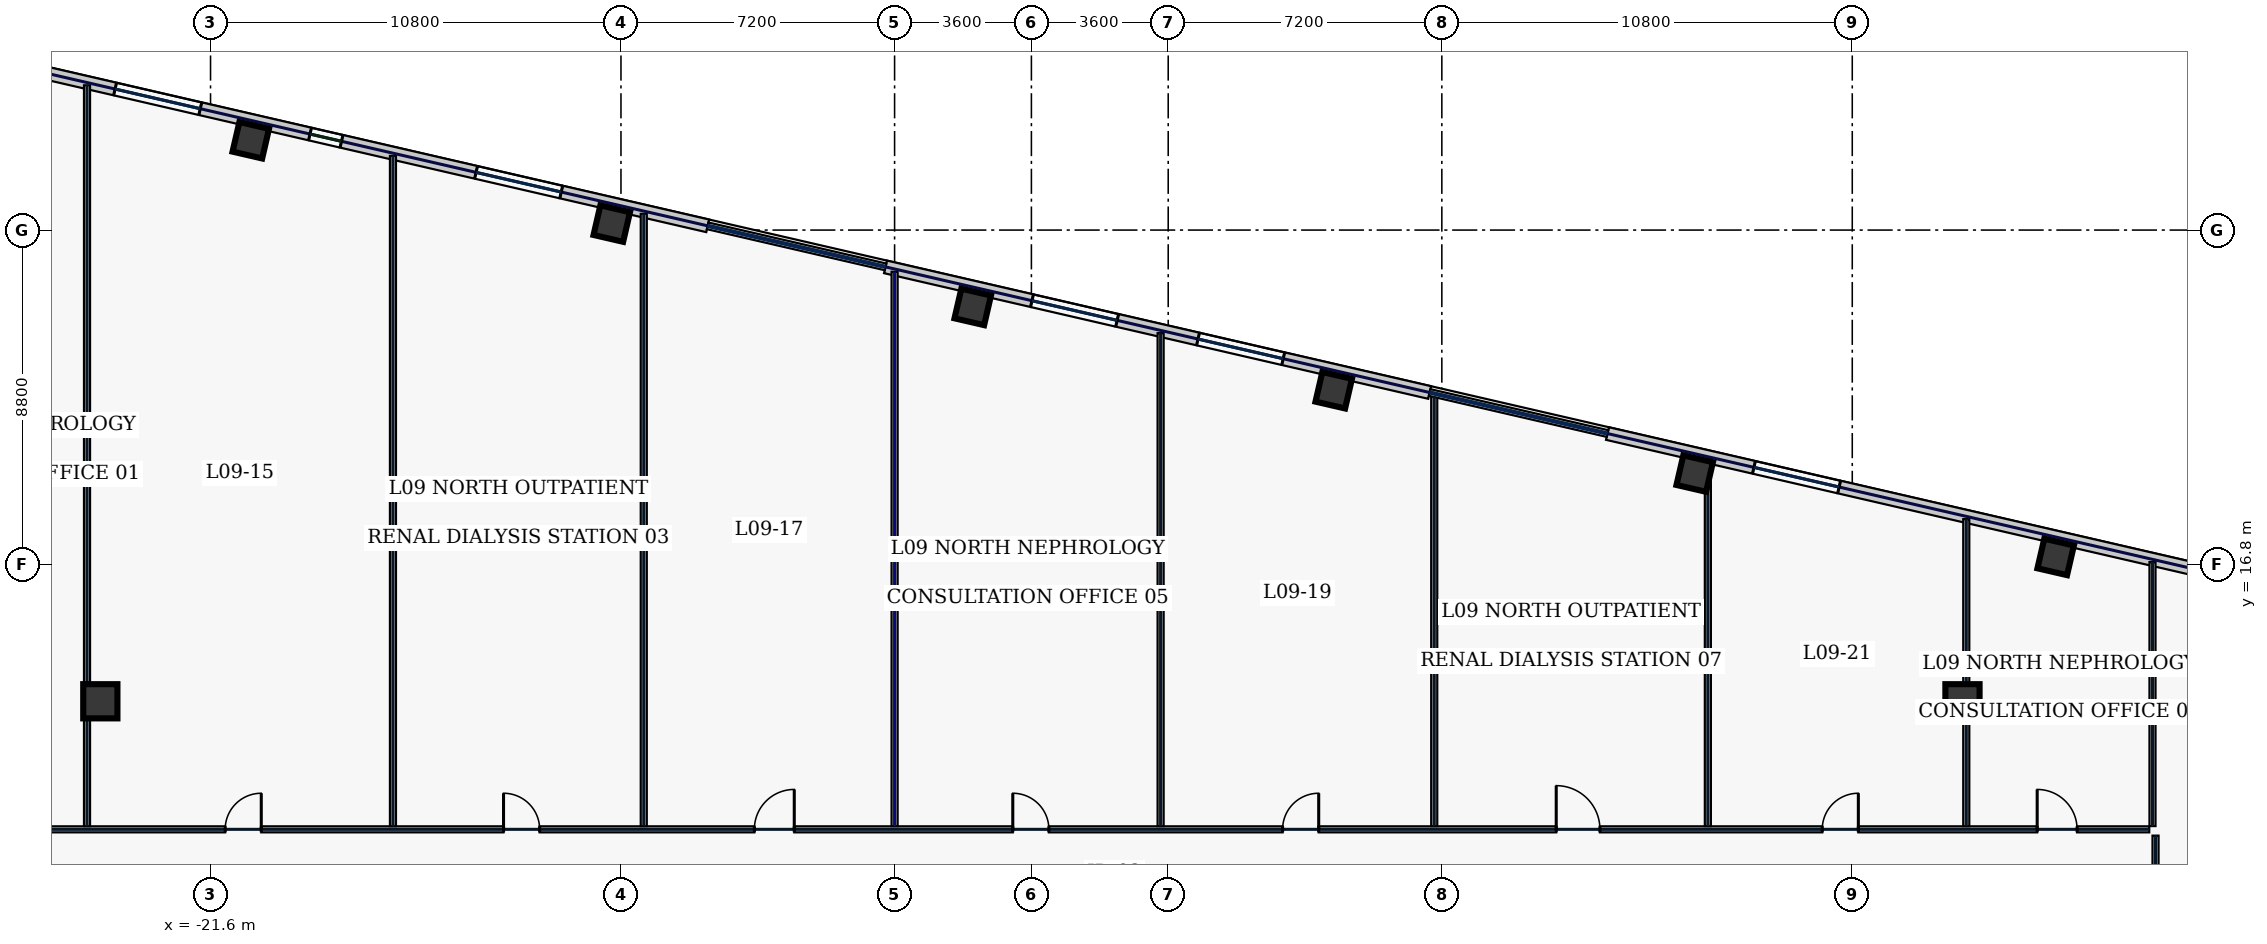
"""IFC4 building model, lengths in metres.
Left out: names, types, materials, properties, quantities, classifications, styles, units other than length and angle.
Written with IfcOpenShell. Run it as: python <this file> out.ifc"""

import sys

from ifc_helpers import new_model, si_unit, direction, frame, frame_2d, origin, origin_2d, place, context, subcontext, project, spatial, rectangle, hollow_rectangle, extrude, element, fill, save


model = new_model("IFC4")
c1 = context("Model", 3, precision=1e-05, world=origin(), true_north=direction((0.0, 1.0)))
c2 = subcontext(c1, "Body", "Model", "MODEL_VIEW")
j1 = project(units=[si_unit("LENGTHUNIT", "METRE"), si_unit("PLANEANGLEUNIT", "RADIAN")], contexts=[c1])
p1 = place(None, origin())
s1 = spatial("IfcSite", under=j1, at=p1, CompositionType="ELEMENT")
p2 = place(p1, origin())
s2 = spatial("IfcBuilding", under=s1, at=p2, CompositionType="ELEMENT")
p3 = place(p2, frame((0.0, 0.0, 47.4)))
s3 = spatial("IfcBuildingStorey", under=s2, at=p3, CompositionType="ELEMENT", Elevation=47.4)
for number, where, z_axis, x_axis in (
    (1, (-24.5, 13.2, 0.0), (0.0, 0.0, 1.0), (1.0, 0.0, 0.0)),
    (2, (24.5, 13.2, 0.0), (0.0, 0.0, 1.0), (1.0, 0.0, 0.0)),
):
    element("IfcColumn", number, at=place(p3, frame(where, z_axis=z_axis, x_axis=x_axis)), inside=s3, PredefinedType="COLUMN", context=c2, shape_type="SweptSolid", body=[
        extrude(hollow_rectangle(XDim=0.9, YDim=0.9, WallThickness=0.04, at=origin_2d()), origin(), (0.0, 0.0, 1.0), 3.74),
    ])
for number, where, z_axis, x_axis in (
    (3, (26.952, 16.999, 0.0), (0.0, 0.0, 1.0), (0.974, -0.225, 0.0)),
    (4, (17.454, 19.192, 0.0), (0.0, 0.0, 1.0), (0.974, -0.225, 0.0)),
    (5, (7.955, 21.385, 0.0), (0.0, 0.0, 1.0), (0.974, -0.225, 0.0)),
    (6, (-1.544, 23.578, 0.0), (0.0, 0.0, 1.0), (0.974, -0.225, 0.0)),
    (7, (-11.042, 25.771, 0.0), (0.0, 0.0, 1.0), (0.974, -0.225, 0.0)),
    (8, (-20.541, 27.964, 0.0), (0.0, 0.0, 1.0), (0.974, -0.225, 0.0)),
):
    element("IfcColumn", number, at=place(p3, frame(where, z_axis=z_axis, x_axis=x_axis)), inside=s3, PredefinedType="COLUMN", context=c2, shape_type="SweptSolid", body=[
        extrude(hollow_rectangle(XDim=0.8, YDim=0.8, WallThickness=0.036, at=origin_2d()), origin(), (0.0, 0.0, 1.0), 3.74),
    ])
p4 = place(p3, frame((37.229, 15.15, 0.0), z_axis=(0.0, 0.0, 1.0), x_axis=(-0.97436993772, 0.224951604723, 0.0)))
e9 = element("IfcWall", 9, at=p4, inside=s3, PredefinedType="STANDARD", context=c2, shape_type="SweptSolid", body=[
    extrude(rectangle(XDim=22.651, YDim=0.34, at=frame_2d((11.326, 0.0))), origin(), (0.0, 0.0, 1.0), 3.74),
])
p5 = place(p4, frame((16.395, 0.0, 0.77)))
e10 = element("IfcOpeningElement", 10, at=p5, cuts=e9, PredefinedType="OPENING", context=c2, shape_type="SweptSolid", body=[
    extrude(rectangle(XDim=2.3, YDim=2.1, at=frame_2d((1.15, 1.05))), frame((0.0, 0.18, 0.0), z_axis=(0.0, -1.0, 0.0), x_axis=(1.0, 0.0, 0.0)), (0.0, 0.0, 1.0), 0.36),
])
p6 = place(p4, frame((2.162, 0.0, 0.77)))
e11 = element("IfcOpeningElement", 11, at=p6, cuts=e9, PredefinedType="OPENING", context=c2, shape_type="SweptSolid", body=[
    extrude(rectangle(XDim=2.3, YDim=2.1, at=frame_2d((1.15, 1.05))), frame((0.0, 0.18, 0.0), z_axis=(0.0, -1.0, 0.0), x_axis=(1.0, 0.0, 0.0)), (0.0, 0.0, 1.0), 0.36),
])
p7 = place(p3, frame((10.481, 21.325, 0.0), z_axis=(0.0, 0.0, 1.0), x_axis=(-0.974369353393, 0.2249541357, 0.0)))
e12 = element("IfcWall", 12, at=p7, inside=s3, PredefinedType="STANDARD", context=c2, shape_type="SweptSolid", body=[
    extrude(rectangle(XDim=14.697, YDim=0.34, at=frame_2d((7.349, 0.0))), origin(), (0.0, 0.0, 1.0), 3.74),
])
p8 = place(p7, frame((8.441, 0.0, 0.77)))
e13 = element("IfcOpeningElement", 13, at=p8, cuts=e12, PredefinedType="OPENING", context=c2, shape_type="SweptSolid", body=[
    extrude(rectangle(XDim=2.3, YDim=2.1, at=frame_2d((1.15, 1.05))), frame((0.0, 0.18, 0.0), z_axis=(0.0, -1.0, 0.0), x_axis=(1.0, 0.0, 0.0)), (0.0, 0.0, 1.0), 0.36),
])
p9 = place(p7, frame((3.956, 0.0, 0.77)))
e14 = element("IfcOpeningElement", 14, at=p9, cuts=e12, PredefinedType="OPENING", context=c2, shape_type="SweptSolid", body=[
    extrude(rectangle(XDim=2.3, YDim=2.1, at=frame_2d((1.15, 1.05))), frame((0.0, 0.18, 0.0), z_axis=(0.0, -1.0, 0.0), x_axis=(1.0, 0.0, 0.0)), (0.0, 0.0, 1.0), 0.36),
])
p10 = place(p3, frame((-8.517, 25.711, 0.0), z_axis=(0.0, 0.0, 1.0), x_axis=(-0.974372845456, 0.224939009598, 0.0)))
e15 = element("IfcWall", 15, at=p10, inside=s3, PredefinedType="STANDARD", context=c2, shape_type="SweptSolid", body=[
    extrude(rectangle(XDim=22.652, YDim=0.34, at=frame_2d((11.326, 0.0))), origin(), (0.0, 0.0, 1.0), 3.74),
])
p11 = place(p10, frame((18.189, 0.0, 0.77)))
e16 = element("IfcOpeningElement", 16, at=p11, cuts=e15, PredefinedType="OPENING", context=c2, shape_type="SweptSolid", body=[
    extrude(rectangle(XDim=2.3, YDim=2.1, at=frame_2d((1.15, 1.05))), frame((0.0, 0.18, 0.0), z_axis=(0.0, -1.0, 0.0), x_axis=(1.0, 0.0, 0.0)), (0.0, 0.0, 1.0), 0.36),
])
p12 = place(p10, frame((13.705, 0.0, 0.77)))
e17 = element("IfcOpeningElement", 17, at=p12, cuts=e15, PredefinedType="OPENING", context=c2, shape_type="SweptSolid", body=[
    extrude(rectangle(XDim=2.3, YDim=2.1, at=frame_2d((1.15, 1.05))), frame((0.0, 0.18, 0.0), z_axis=(0.0, -1.0, 0.0), x_axis=(1.0, 0.0, 0.0)), (0.0, 0.0, 1.0), 0.36),
])
p13 = place(p10, frame((9.891, 0.0, 0.77)))
e18 = element("IfcOpeningElement", 18, at=p13, cuts=e15, PredefinedType="OPENING", context=c2, shape_type="SweptSolid", body=[
    extrude(rectangle(XDim=0.85, YDim=1.85, at=frame_2d((0.425, 0.925))), frame((0.0, 0.18, 0.0), z_axis=(0.0, -1.0, 0.0), x_axis=(1.0, 0.0, 0.0)), (0.0, 0.0, 1.0), 0.36),
])
p14 = place(p10, frame((3.956, 0.0, 0.77)))
e19 = element("IfcOpeningElement", 19, at=p14, cuts=e15, PredefinedType="OPENING", context=c2, shape_type="SweptSolid", body=[
    extrude(rectangle(XDim=2.3, YDim=2.1, at=frame_2d((1.15, 1.05))), frame((0.0, 0.18, 0.0), z_axis=(0.0, -1.0, 0.0), x_axis=(1.0, 0.0, 0.0)), (0.0, 0.0, 1.0), 0.36),
])
p15 = place(p3, frame((-29.415, 9.83, 0.0), z_axis=(0.0, 0.0, 1.0), x_axis=(1.0, 0.0, 0.0)))
e20 = element("IfcWall", 20, at=p15, inside=s3, PredefinedType="PARTITIONING", context=c2, shape_type="SweptSolid", body=[
    extrude(rectangle(XDim=58.83, YDim=0.16, at=frame_2d((29.415, 0.0))), origin(), (0.0, 0.0, 1.0), 3.74),
])
p16 = place(p15, frame((2.044, 0.0, 0.0)))
e21 = element("IfcOpeningElement", 21, at=p16, cuts=e20, PredefinedType="OPENING", context=c2, shape_type="SweptSolid", body=[
    extrude(rectangle(XDim=0.95, YDim=2.2, at=frame_2d((0.475, 1.1))), frame((0.0, 0.09, 0.0), z_axis=(0.0, -1.0, 0.0), x_axis=(1.0, 0.0, 0.0)), (0.0, 0.0, 1.0), 0.18),
])
p17 = place(p15, frame((8.2, 0.0, 0.0)))
e22 = element("IfcOpeningElement", 22, at=p17, cuts=e20, PredefinedType="OPENING", context=c2, shape_type="SweptSolid", body=[
    extrude(rectangle(XDim=0.95, YDim=2.2, at=frame_2d((0.475, 1.1))), frame((0.0, 0.09, 0.0), z_axis=(0.0, -1.0, 0.0), x_axis=(1.0, 0.0, 0.0)), (0.0, 0.0, 1.0), 0.18),
])
p18 = place(p15, frame((15.525, 0.0, 0.0)))
e23 = element("IfcOpeningElement", 23, at=p18, cuts=e20, PredefinedType="OPENING", context=c2, shape_type="SweptSolid", body=[
    extrude(rectangle(XDim=0.95, YDim=2.2, at=frame_2d((0.475, 1.1))), frame((0.0, 0.09, 0.0), z_axis=(0.0, -1.0, 0.0), x_axis=(1.0, 0.0, 0.0)), (0.0, 0.0, 1.0), 0.18),
])
p19 = place(p15, frame((22.125, 0.0, 0.0)))
e24 = element("IfcOpeningElement", 24, at=p19, cuts=e20, PredefinedType="OPENING", context=c2, shape_type="SweptSolid", body=[
    extrude(rectangle(XDim=1.05, YDim=2.2, at=frame_2d((0.525, 1.1))), frame((0.0, 0.09, 0.0), z_axis=(0.0, -1.0, 0.0), x_axis=(1.0, 0.0, 0.0)), (0.0, 0.0, 1.0), 0.18),
])
p20 = place(p15, frame((28.925, 0.0, 0.0)))
e25 = element("IfcOpeningElement", 25, at=p20, cuts=e20, PredefinedType="OPENING", context=c2, shape_type="SweptSolid", body=[
    extrude(rectangle(XDim=0.95, YDim=2.2, at=frame_2d((0.475, 1.1))), frame((0.0, 0.09, 0.0), z_axis=(0.0, -1.0, 0.0), x_axis=(1.0, 0.0, 0.0)), (0.0, 0.0, 1.0), 0.18),
])
p21 = place(p15, frame((36.025, 0.0, 0.0)))
e26 = element("IfcOpeningElement", 26, at=p21, cuts=e20, PredefinedType="OPENING", context=c2, shape_type="SweptSolid", body=[
    extrude(rectangle(XDim=0.95, YDim=2.2, at=frame_2d((0.475, 1.1))), frame((0.0, 0.09, 0.0), z_axis=(0.0, -1.0, 0.0), x_axis=(1.0, 0.0, 0.0)), (0.0, 0.0, 1.0), 0.18),
])
p22 = place(p15, frame((43.225, 0.0, 0.0)))
e27 = element("IfcOpeningElement", 27, at=p22, cuts=e20, PredefinedType="OPENING", context=c2, shape_type="SweptSolid", body=[
    extrude(rectangle(XDim=1.15, YDim=2.2, at=frame_2d((0.575, 1.1))), frame((0.0, 0.09, 0.0), z_axis=(0.0, -1.0, 0.0), x_axis=(1.0, 0.0, 0.0)), (0.0, 0.0, 1.0), 0.18),
])
p23 = place(p15, frame((50.225, 0.0, 0.0)))
e28 = element("IfcOpeningElement", 28, at=p23, cuts=e20, PredefinedType="OPENING", context=c2, shape_type="SweptSolid", body=[
    extrude(rectangle(XDim=0.95, YDim=2.2, at=frame_2d((0.475, 1.1))), frame((0.0, 0.09, 0.0), z_axis=(0.0, -1.0, 0.0), x_axis=(1.0, 0.0, 0.0)), (0.0, 0.0, 1.0), 0.18),
])
p24 = place(p15, frame((55.881, 0.0, 0.0)))
e29 = element("IfcOpeningElement", 29, at=p24, cuts=e20, PredefinedType="OPENING", context=c2, shape_type="SweptSolid", body=[
    extrude(rectangle(XDim=1.05, YDim=2.2, at=frame_2d((0.525, 1.1))), frame((0.0, 0.09, 0.0), z_axis=(0.0, -1.0, 0.0), x_axis=(1.0, 0.0, 0.0)), (0.0, 0.0, 1.0), 0.18),
])
p25 = place(p3, frame((29.58, 9.665, 0.0), z_axis=(0.0, 0.0, 1.0), x_axis=(0.0, -1.0, 0.0)))
e30 = element("IfcWall", 30, at=p25, inside=s3, PredefinedType="PARTITIONING", context=c2, shape_type="SweptSolid", body=[
    extrude(rectangle(XDim=19.28, YDim=0.16, at=frame_2d((9.64, 0.0))), origin(), (0.0, 0.0, 1.0), 3.74),
])
p26 = place(p25, frame((16.531, 0.0, 0.0)))
e31 = element("IfcOpeningElement", 31, at=p26, cuts=e30, PredefinedType="OPENING", context=c2, shape_type="SweptSolid", body=[
    extrude(rectangle(XDim=0.95, YDim=2.2, at=frame_2d((0.475, 1.1))), frame((0.0, 0.09, 0.0), z_axis=(0.0, -1.0, 0.0), x_axis=(1.0, 0.0, 0.0)), (0.0, 0.0, 1.0), 0.18),
])
p27 = place(p25, frame((11.25, 0.0, 0.0)))
e32 = element("IfcOpeningElement", 32, at=p27, cuts=e30, PredefinedType="OPENING", context=c2, shape_type="SweptSolid", body=[
    extrude(rectangle(XDim=0.95, YDim=2.2, at=frame_2d((0.475, 1.1))), frame((0.0, 0.09, 0.0), z_axis=(0.0, -1.0, 0.0), x_axis=(1.0, 0.0, 0.0)), (0.0, 0.0, 1.0), 0.18),
])
p28 = place(p25, frame((6.05, 0.0, 0.0)))
e33 = element("IfcOpeningElement", 33, at=p28, cuts=e30, PredefinedType="OPENING", context=c2, shape_type="SweptSolid", body=[
    extrude(rectangle(XDim=0.95, YDim=2.2, at=frame_2d((0.475, 1.1))), frame((0.0, 0.09, 0.0), z_axis=(0.0, -1.0, 0.0), x_axis=(1.0, 0.0, 0.0)), (0.0, 0.0, 1.0), 0.18),
])
p29 = place(p25, frame((1.994, 0.0, 0.0)))
e34 = element("IfcOpeningElement", 34, at=p29, cuts=e30, PredefinedType="OPENING", context=c2, shape_type="SweptSolid", body=[
    extrude(rectangle(XDim=0.95, YDim=2.2, at=frame_2d((0.475, 1.1))), frame((0.0, 0.09, 0.0), z_axis=(0.0, -1.0, 0.0), x_axis=(1.0, 0.0, 0.0)), (0.0, 0.0, 1.0), 0.18),
])
p30 = place(p3, frame((29.5, 9.915, 0.0), z_axis=(0.0, 0.0, 1.0), x_axis=(0.0, 1.0, 0.0)))
e35 = element("IfcWall", 35, at=p30, inside=s3, PredefinedType="PARTITIONING", context=c2, shape_type="SweptSolid", body=[
    extrude(rectangle(XDim=6.947, YDim=0.16, at=frame_2d((3.474, 0.0))), origin(), (0.0, 0.0, 1.0), 3.74),
])
p31 = place(p3, frame((-24.85, 9.915, 0.0), z_axis=(0.0, 0.0, 1.0), x_axis=(0.0, 1.0, 0.0)))
e36 = element("IfcWall", 36, at=p31, inside=s3, PredefinedType="PARTITIONING", context=c2, shape_type="SweptSolid", body=[
    extrude(rectangle(XDim=19.495, YDim=0.16, at=frame_2d((9.748, 0.0))), origin(), (0.0, 0.0, 1.0), 3.74),
])
p32 = place(p3, frame((-16.8, 9.915, 0.0), z_axis=(0.0, 0.0, 1.0), x_axis=(0.0, 1.0, 0.0)))
e37 = element("IfcWall", 37, at=p32, inside=s3, PredefinedType="PARTITIONING", context=c2, shape_type="SweptSolid", body=[
    extrude(rectangle(XDim=17.636, YDim=0.16, at=frame_2d((8.818, 0.0))), origin(), (0.0, 0.0, 1.0), 3.74),
])
p33 = place(p3, frame((-10.2, 9.915, 0.0), z_axis=(0.0, 0.0, 1.0), x_axis=(0.0, 1.0, 0.0)))
e38 = element("IfcWall", 38, at=p33, inside=s3, PredefinedType="PARTITIONING", context=c2, shape_type="SweptSolid", body=[
    extrude(rectangle(XDim=16.113, YDim=0.16, at=frame_2d((8.056, 0.0))), origin(), (0.0, 0.0, 1.0), 3.74),
])
p34 = place(p3, frame((-3.6, 9.915, 0.0), z_axis=(0.0, 0.0, 1.0), x_axis=(0.0, 1.0, 0.0)))
e39 = element("IfcWall", 39, at=p34, inside=s3, PredefinedType="PARTITIONING", context=c2, shape_type="SweptSolid", body=[
    extrude(rectangle(XDim=14.589, YDim=0.16, at=frame_2d((7.294, 0.0))), origin(), (0.0, 0.0, 1.0), 3.235),
])
p35 = place(p3, frame((3.4, 9.915, 0.0), z_axis=(0.0, 0.0, 1.0), x_axis=(0.0, 1.0, 0.0)))
e40 = element("IfcWall", 40, at=p35, inside=s3, PredefinedType="PARTITIONING", context=c2, shape_type="SweptSolid", body=[
    extrude(rectangle(XDim=12.973, YDim=0.16, at=frame_2d((6.486, 0.0))), origin(), (0.0, 0.0, 1.0), 3.74),
])
p36 = place(p3, frame((10.6, 9.915, 0.0), z_axis=(0.0, 0.0, 1.0), x_axis=(0.0, 1.0, 0.0)))
e41 = element("IfcWall", 41, at=p36, inside=s3, PredefinedType="PARTITIONING", context=c2, shape_type="SweptSolid", body=[
    extrude(rectangle(XDim=11.311, YDim=0.16, at=frame_2d((5.655, 0.0))), origin(), (0.0, 0.0, 1.0), 3.74),
])
p37 = place(p3, frame((17.8, 9.915, 0.0), z_axis=(0.0, 0.0, 1.0), x_axis=(0.0, 1.0, 0.0)))
e42 = element("IfcWall", 42, at=p37, inside=s3, PredefinedType="PARTITIONING", context=c2, shape_type="SweptSolid", body=[
    extrude(rectangle(XDim=9.648, YDim=0.16, at=frame_2d((4.824, 0.0))), origin(), (0.0, 0.0, 1.0), 3.74),
])
p38 = place(p3, frame((24.6, 9.915, 0.0), z_axis=(0.0, 0.0, 1.0), x_axis=(0.0, 1.0, 0.0)))
e43 = element("IfcWall", 43, at=p38, inside=s3, PredefinedType="PARTITIONING", context=c2, shape_type="SweptSolid", body=[
    extrude(rectangle(XDim=8.079, YDim=0.16, at=frame_2d((4.039, 0.0))), origin(), (0.0, 0.0, 1.0), 3.74),
])
p39 = place(p5, origin())
e44 = element("IfcWindow", 44, at=p39, inside=s3, PartitioningType="SINGLE_PANEL", PredefinedType="WINDOW", context=c2, shape_type="SweptSolid", body=[
    extrude(rectangle(XDim=2.3, YDim=2.1, at=frame_2d((1.15, 1.05))), frame((0.0, 0.03, 0.0), z_axis=(0.0, -1.0, 0.0), x_axis=(1.0, 0.0, 0.0)), (0.0, 0.0, 1.0), 0.06),
])
fill(e10, e44)
p40 = place(p8, origin())
e45 = element("IfcWindow", 45, at=p40, inside=s3, PartitioningType="SINGLE_PANEL", PredefinedType="WINDOW", context=c2, shape_type="SweptSolid", body=[
    extrude(rectangle(XDim=2.3, YDim=2.1, at=frame_2d((1.15, 1.05))), frame((0.0, 0.03, 0.0), z_axis=(0.0, -1.0, 0.0), x_axis=(1.0, 0.0, 0.0)), (0.0, 0.0, 1.0), 0.06),
])
fill(e13, e45)
p41 = place(p9, origin())
e46 = element("IfcWindow", 46, at=p41, inside=s3, PartitioningType="SINGLE_PANEL", PredefinedType="WINDOW", context=c2, shape_type="SweptSolid", body=[
    extrude(rectangle(XDim=2.3, YDim=2.1, at=frame_2d((1.15, 1.05))), frame((0.0, 0.03, 0.0), z_axis=(0.0, -1.0, 0.0), x_axis=(1.0, 0.0, 0.0)), (0.0, 0.0, 1.0), 0.06),
])
fill(e14, e46)
p42 = place(p12, origin())
e47 = element("IfcWindow", 47, at=p42, inside=s3, PartitioningType="SINGLE_PANEL", PredefinedType="WINDOW", context=c2, shape_type="SweptSolid", body=[
    extrude(rectangle(XDim=2.3, YDim=2.1, at=frame_2d((1.15, 1.05))), frame((0.0, 0.03, 0.0), z_axis=(0.0, -1.0, 0.0), x_axis=(1.0, 0.0, 0.0)), (0.0, 0.0, 1.0), 0.06),
])
fill(e17, e47)
p43 = place(p13, origin())
e48 = element("IfcWindow", 48, at=p43, inside=s3, PartitioningType="SINGLE_PANEL", PredefinedType="WINDOW", context=c2, shape_type="SweptSolid", body=[
    extrude(rectangle(XDim=0.85, YDim=1.85, at=frame_2d((0.425, 0.925))), frame((0.0, 0.03, 0.0), z_axis=(0.0, -1.0, 0.0), x_axis=(1.0, 0.0, 0.0)), (0.0, 0.0, 1.0), 0.06),
])
fill(e18, e48)
p44 = place(p14, origin())
e49 = element("IfcWindow", 49, at=p44, inside=s3, PartitioningType="SINGLE_PANEL", PredefinedType="WINDOW", context=c2, shape_type="SweptSolid", body=[
    extrude(rectangle(XDim=2.3, YDim=2.1, at=frame_2d((1.15, 1.05))), frame((0.0, 0.03, 0.0), z_axis=(0.0, -1.0, 0.0), x_axis=(1.0, 0.0, 0.0)), (0.0, 0.0, 1.0), 0.06),
])
fill(e19, e49)
p45 = place(p17, origin())
e50 = element("IfcDoor", 50, at=p45, inside=s3, OperationType="SINGLE_SWING_RIGHT", PredefinedType="DOOR", context=c2, shape_type="SweptSolid", body=[
    extrude(rectangle(XDim=0.95, YDim=2.2, at=frame_2d((0.475, 1.1))), frame((0.0, 0.025, 0.0), z_axis=(0.0, -1.0, 0.0), x_axis=(1.0, 0.0, 0.0)), (0.0, 0.0, 1.0), 0.05),
])
fill(e22, e50)
p46 = place(p18, origin())
e51 = element("IfcDoor", 51, at=p46, inside=s3, OperationType="SINGLE_SWING_LEFT", PredefinedType="DOOR", context=c2, shape_type="SweptSolid", body=[
    extrude(rectangle(XDim=0.95, YDim=2.2, at=frame_2d((0.475, 1.1))), frame((0.0, 0.025, 0.0), z_axis=(0.0, -1.0, 0.0), x_axis=(1.0, 0.0, 0.0)), (0.0, 0.0, 1.0), 0.05),
])
fill(e23, e51)
p47 = place(p19, origin())
e52 = element("IfcDoor", 52, at=p47, inside=s3, OperationType="SINGLE_SWING_RIGHT", PredefinedType="DOOR", context=c2, shape_type="SweptSolid", body=[
    extrude(rectangle(XDim=1.05, YDim=2.2, at=frame_2d((0.525, 1.1))), frame((0.0, 0.025, 0.0), z_axis=(0.0, -1.0, 0.0), x_axis=(1.0, 0.0, 0.0)), (0.0, 0.0, 1.0), 0.05),
])
fill(e24, e52)
p48 = place(p20, origin())
e53 = element("IfcDoor", 53, at=p48, inside=s3, OperationType="SINGLE_SWING_LEFT", PredefinedType="DOOR", context=c2, shape_type="SweptSolid", body=[
    extrude(rectangle(XDim=0.95, YDim=2.2, at=frame_2d((0.475, 1.1))), frame((0.0, 0.025, 0.0), z_axis=(0.0, -1.0, 0.0), x_axis=(1.0, 0.0, 0.0)), (0.0, 0.0, 1.0), 0.05),
])
fill(e25, e53)
p49 = place(p21, origin())
e54 = element("IfcDoor", 54, at=p49, inside=s3, OperationType="SINGLE_SWING_RIGHT", PredefinedType="DOOR", context=c2, shape_type="SweptSolid", body=[
    extrude(rectangle(XDim=0.95, YDim=2.2, at=frame_2d((0.475, 1.1))), frame((0.0, 0.025, 0.0), z_axis=(0.0, -1.0, 0.0), x_axis=(1.0, 0.0, 0.0)), (0.0, 0.0, 1.0), 0.05),
])
fill(e26, e54)
p50 = place(p22, origin())
e55 = element("IfcDoor", 55, at=p50, inside=s3, OperationType="SINGLE_SWING_LEFT", PredefinedType="DOOR", context=c2, shape_type="SweptSolid", body=[
    extrude(rectangle(XDim=1.15, YDim=2.2, at=frame_2d((0.575, 1.1))), frame((0.0, 0.025, 0.0), z_axis=(0.0, -1.0, 0.0), x_axis=(1.0, 0.0, 0.0)), (0.0, 0.0, 1.0), 0.05),
])
fill(e27, e55)
p51 = place(p23, origin())
e56 = element("IfcDoor", 56, at=p51, inside=s3, OperationType="SINGLE_SWING_RIGHT", PredefinedType="DOOR", context=c2, shape_type="SweptSolid", body=[
    extrude(rectangle(XDim=0.95, YDim=2.2, at=frame_2d((0.475, 1.1))), frame((0.0, 0.025, 0.0), z_axis=(0.0, -1.0, 0.0), x_axis=(1.0, 0.0, 0.0)), (0.0, 0.0, 1.0), 0.05),
])
fill(e28, e56)
p52 = place(p24, origin())
e57 = element("IfcDoor", 57, at=p52, inside=s3, OperationType="SINGLE_SWING_LEFT", PredefinedType="DOOR", context=c2, shape_type="SweptSolid", body=[
    extrude(rectangle(XDim=1.05, YDim=2.2, at=frame_2d((0.525, 1.1))), frame((0.0, 0.025, 0.0), z_axis=(0.0, -1.0, 0.0), x_axis=(1.0, 0.0, 0.0)), (0.0, 0.0, 1.0), 0.05),
])
fill(e29, e57)
save(model, sys.argv[1])
